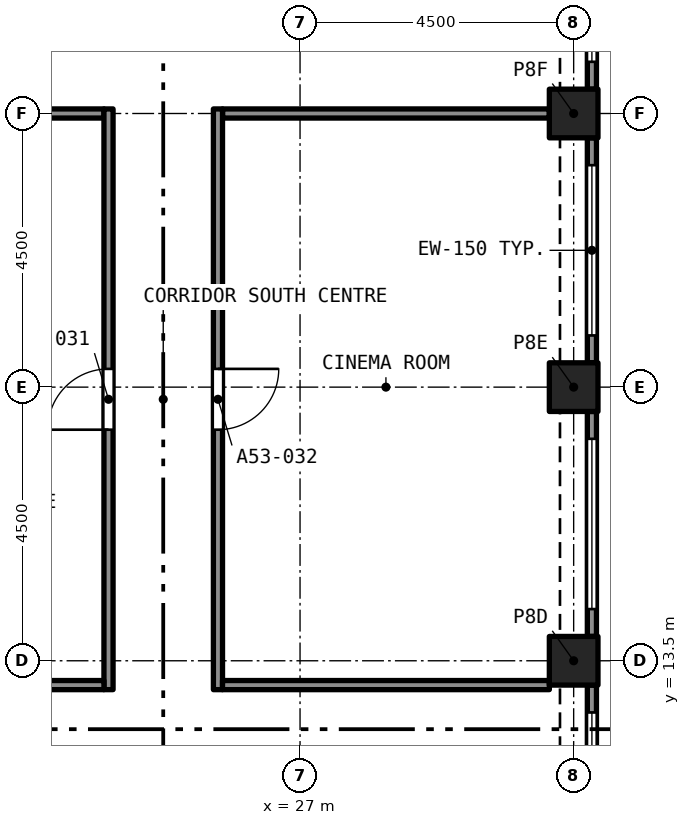
"""IFC4 building model, lengths in metres.
Left out: names, types, materials, properties, quantities, classifications, styles, units other than length and angle.
Written with IfcOpenShell. Run it as: python <this file> out.ifc"""

import sys

from ifc_helpers import new_model, si_unit, direction, frame, frame_2d, origin, origin_2d, place, context, subcontext, project, spatial, rectangle, extrude, element, fill, save


model = new_model("IFC4")
c1 = context("Model", 3, precision=1e-05, world=origin(), true_north=direction((0.0, 1.0)))
c2 = subcontext(c1, "Body", "Model", "MODEL_VIEW")
j1 = project(units=[si_unit("LENGTHUNIT", "METRE"), si_unit("PLANEANGLEUNIT", "RADIAN")], contexts=[c1])
p1 = place(None, origin())
s1 = spatial("IfcSite", under=j1, at=p1, CompositionType="ELEMENT")
p2 = place(p1, origin())
s2 = spatial("IfcBuilding", under=s1, at=p2, CompositionType="ELEMENT")
p3 = place(p2, frame((0.0, 0.0, 192.3)))
s3 = spatial("IfcBuildingStorey", under=s2, at=p3, CompositionType="ELEMENT", Elevation=192.3)
for number, where, z_axis, x_axis in (
    (1, (31.5, 13.5, 0.0), (0.0, 0.0, 1.0), (1.0, 0.0, 0.0)),
    (2, (31.5, 18.0, 0.0), (0.0, 0.0, 1.0), (1.0, 0.0, 0.0)),
    (3, (31.5, 22.5, 0.0), (0.0, 0.0, 1.0), (1.0, 0.0, 0.0)),
):
    element("IfcColumn", number, at=place(p3, frame(where, z_axis=z_axis, x_axis=x_axis)), inside=s3, PredefinedType="COLUMN", context=c2, shape_type="SweptSolid", body=[
        extrude(rectangle(XDim=0.8, YDim=0.8, at=origin_2d()), origin(), (0.0, 0.0, 1.0), 3.2),
    ])
p4 = place(p3, frame((31.8, 13.1, 0.0), z_axis=(0.0, 0.0, 1.0), x_axis=(0.0, -1.0, 0.0)))
e4 = element("IfcWall", 4, at=p4, inside=s3, PredefinedType="SOLIDWALL", context=c2, shape_type="SweptSolid", body=[
    extrude(rectangle(XDim=3.7, YDim=0.15, at=frame_2d((1.85, 0.0))), origin(), (0.0, 0.0, 1.0), 3.2),
])
p5 = place(p4, frame((0.45, 0.0, 0.45)))
e5 = element("IfcOpeningElement", 5, at=p5, cuts=e4, PredefinedType="OPENING", context=c2, shape_type="SweptSolid", body=[
    extrude(rectangle(XDim=2.8, YDim=1.95, at=frame_2d((1.4, 0.975))), frame((0.0, 0.085, 0.0), z_axis=(0.0, -1.0, 0.0), x_axis=(1.0, 0.0, 0.0)), (0.0, 0.0, 1.0), 0.17),
])
p6 = place(p3, frame((31.8, 17.6, 0.0), z_axis=(0.0, 0.0, 1.0), x_axis=(0.0, -1.0, 0.0)))
e6 = element("IfcWall", 6, at=p6, inside=s3, PredefinedType="SOLIDWALL", context=c2, shape_type="SweptSolid", body=[
    extrude(rectangle(XDim=3.7, YDim=0.15, at=frame_2d((1.85, 0.0))), origin(), (0.0, 0.0, 1.0), 3.2),
])
p7 = place(p6, frame((0.45, 0.0, 0.45)))
e7 = element("IfcOpeningElement", 7, at=p7, cuts=e6, PredefinedType="OPENING", context=c2, shape_type="SweptSolid", body=[
    extrude(rectangle(XDim=2.8, YDim=1.95, at=frame_2d((1.4, 0.975))), frame((0.0, 0.085, 0.0), z_axis=(0.0, -1.0, 0.0), x_axis=(1.0, 0.0, 0.0)), (0.0, 0.0, 1.0), 0.17),
])
p8 = place(p3, frame((31.8, 22.1, 0.0), z_axis=(0.0, 0.0, 1.0), x_axis=(0.0, -1.0, 0.0)))
e8 = element("IfcWall", 8, at=p8, inside=s3, PredefinedType="SOLIDWALL", context=c2, shape_type="SweptSolid", body=[
    extrude(rectangle(XDim=3.7, YDim=0.15, at=frame_2d((1.85, 0.0))), origin(), (0.0, 0.0, 1.0), 3.2),
])
p9 = place(p8, frame((0.45, 0.0, 0.45)))
e9 = element("IfcOpeningElement", 9, at=p9, cuts=e8, PredefinedType="OPENING", context=c2, shape_type="SweptSolid", body=[
    extrude(rectangle(XDim=2.8, YDim=1.95, at=frame_2d((1.4, 0.975))), frame((0.0, 0.085, 0.0), z_axis=(0.0, -1.0, 0.0), x_axis=(1.0, 0.0, 0.0)), (0.0, 0.0, 1.0), 0.17),
])
p10 = place(p3, frame((31.8, 26.6, 0.0), z_axis=(0.0, 0.0, 1.0), x_axis=(0.0, -1.0, 0.0)))
e10 = element("IfcWall", 10, at=p10, inside=s3, PredefinedType="SOLIDWALL", context=c2, shape_type="SweptSolid", body=[
    extrude(rectangle(XDim=3.7, YDim=0.15, at=frame_2d((1.85, 0.0))), origin(), (0.0, 0.0, 1.0), 3.2),
])
p11 = place(p10, frame((0.45, 0.0, 0.45)))
e11 = element("IfcOpeningElement", 11, at=p11, cuts=e10, PredefinedType="OPENING", context=c2, shape_type="SweptSolid", body=[
    extrude(rectangle(XDim=2.8, YDim=1.95, at=frame_2d((1.4, 0.975))), frame((0.0, 0.085, 0.0), z_axis=(0.0, -1.0, 0.0), x_axis=(1.0, 0.0, 0.0)), (0.0, 0.0, 1.0), 0.17),
])
for number, where, z_axis, x_axis in (
    (12, (18.4, 22.5, 0.0), (0.0, 0.0, 1.0), (1.0, 0.0, 0.0)),
    (13, (25.725, 22.5, 0.0), (0.0, 0.0, 1.0), (1.0, 0.0, 0.0)),
):
    element("IfcWall", number, at=place(p3, frame(where, z_axis=z_axis, x_axis=x_axis)), inside=s3, PredefinedType="PARTITIONING", context=c2, shape_type="SweptSolid", body=[
        extrude(rectangle(XDim=5.375, YDim=0.15, at=frame_2d((2.688, 0.0))), origin(), (0.0, 0.0, 1.0), 2.75),
    ])
p12 = place(p3, frame((23.85, 13.025, 0.0), z_axis=(0.0, 0.0, 1.0), x_axis=(0.0, 1.0, 0.0)))
e14 = element("IfcWall", 14, at=p12, inside=s3, PredefinedType="PARTITIONING", context=c2, shape_type="SweptSolid", body=[
    extrude(rectangle(XDim=9.55, YDim=0.15, at=frame_2d((4.775, 0.0))), origin(), (0.0, 0.0, 1.0), 2.75),
])
p13 = place(p12, frame((4.275, 0.0, 0.0)))
e15 = element("IfcOpeningElement", 15, at=p13, cuts=e14, PredefinedType="OPENING", context=c2, shape_type="SweptSolid", body=[
    extrude(rectangle(XDim=1.0, YDim=2.1, at=frame_2d((0.5, 1.05))), frame((0.0, 0.085, 0.0), z_axis=(0.0, -1.0, 0.0), x_axis=(1.0, 0.0, 0.0)), (0.0, 0.0, 1.0), 0.17),
])
p14 = place(p3, frame((25.65, 22.575, 0.0), z_axis=(0.0, 0.0, 1.0), x_axis=(0.0, -1.0, 0.0)))
e16 = element("IfcWall", 16, at=p14, inside=s3, PredefinedType="PARTITIONING", context=c2, shape_type="SweptSolid", body=[
    extrude(rectangle(XDim=9.55, YDim=0.15, at=frame_2d((4.775, 0.0))), origin(), (0.0, 0.0, 1.0), 2.75),
])
p15 = place(p14, frame((4.275, 0.0, 0.0)))
e17 = element("IfcOpeningElement", 17, at=p15, cuts=e16, PredefinedType="OPENING", context=c2, shape_type="SweptSolid", body=[
    extrude(rectangle(XDim=1.0, YDim=2.1, at=frame_2d((0.5, 1.05))), frame((0.0, 0.085, 0.0), z_axis=(0.0, -1.0, 0.0), x_axis=(1.0, 0.0, 0.0)), (0.0, 0.0, 1.0), 0.17),
])
for number, where, z_axis, x_axis in (
    (18, (18.4, 13.1, 0.0), (0.0, 0.0, 1.0), (1.0, 0.0, 0.0)),
    (19, (25.725, 13.1, 0.0), (0.0, 0.0, 1.0), (1.0, 0.0, 0.0)),
):
    element("IfcWall", number, at=place(p3, frame(where, z_axis=z_axis, x_axis=x_axis)), inside=s3, PredefinedType="PARTITIONING", context=c2, shape_type="SweptSolid", body=[
        extrude(rectangle(XDim=5.375, YDim=0.15, at=frame_2d((2.688, 0.0))), origin(), (0.0, 0.0, 1.0), 2.75),
    ])
p16 = place(p5, origin())
e20 = element("IfcWindow", 20, at=p16, inside=s3, PartitioningType="SINGLE_PANEL", PredefinedType="WINDOW", context=c2, shape_type="SweptSolid", body=[
    extrude(rectangle(XDim=2.8, YDim=1.95, at=frame_2d((1.4, 0.975))), frame((0.0, 0.03, 0.0), z_axis=(0.0, -1.0, 0.0), x_axis=(1.0, 0.0, 0.0)), (0.0, 0.0, 1.0), 0.06),
])
fill(e5, e20)
p17 = place(p7, origin())
e21 = element("IfcWindow", 21, at=p17, inside=s3, PartitioningType="SINGLE_PANEL", PredefinedType="WINDOW", context=c2, shape_type="SweptSolid", body=[
    extrude(rectangle(XDim=2.8, YDim=1.95, at=frame_2d((1.4, 0.975))), frame((0.0, 0.03, 0.0), z_axis=(0.0, -1.0, 0.0), x_axis=(1.0, 0.0, 0.0)), (0.0, 0.0, 1.0), 0.06),
])
fill(e7, e21)
p18 = place(p9, origin())
e22 = element("IfcWindow", 22, at=p18, inside=s3, PartitioningType="SINGLE_PANEL", PredefinedType="WINDOW", context=c2, shape_type="SweptSolid", body=[
    extrude(rectangle(XDim=2.8, YDim=1.95, at=frame_2d((1.4, 0.975))), frame((0.0, 0.03, 0.0), z_axis=(0.0, -1.0, 0.0), x_axis=(1.0, 0.0, 0.0)), (0.0, 0.0, 1.0), 0.06),
])
fill(e9, e22)
p19 = place(p11, origin())
e23 = element("IfcWindow", 23, at=p19, inside=s3, PartitioningType="SINGLE_PANEL", PredefinedType="WINDOW", context=c2, shape_type="SweptSolid", body=[
    extrude(rectangle(XDim=2.8, YDim=1.95, at=frame_2d((1.4, 0.975))), frame((0.0, 0.03, 0.0), z_axis=(0.0, -1.0, 0.0), x_axis=(1.0, 0.0, 0.0)), (0.0, 0.0, 1.0), 0.06),
])
fill(e11, e23)
p20 = place(p13, origin())
e24 = element("IfcDoor", 24, at=p20, inside=s3, OperationType="SINGLE_SWING_RIGHT", PredefinedType="DOOR", context=c2, shape_type="SweptSolid", body=[
    extrude(rectangle(XDim=1.0, YDim=2.1, at=frame_2d((0.5, 1.05))), frame((0.0, 0.025, 0.0), z_axis=(0.0, -1.0, 0.0), x_axis=(1.0, 0.0, 0.0)), (0.0, 0.0, 1.0), 0.05),
])
fill(e15, e24)
p21 = place(p15, origin())
e25 = element("IfcDoor", 25, at=p21, inside=s3, OperationType="SINGLE_SWING_LEFT", PredefinedType="DOOR", context=c2, shape_type="SweptSolid", body=[
    extrude(rectangle(XDim=1.0, YDim=2.1, at=frame_2d((0.5, 1.05))), frame((0.0, 0.025, 0.0), z_axis=(0.0, -1.0, 0.0), x_axis=(1.0, 0.0, 0.0)), (0.0, 0.0, 1.0), 0.05),
])
fill(e17, e25)
save(model, sys.argv[1])
